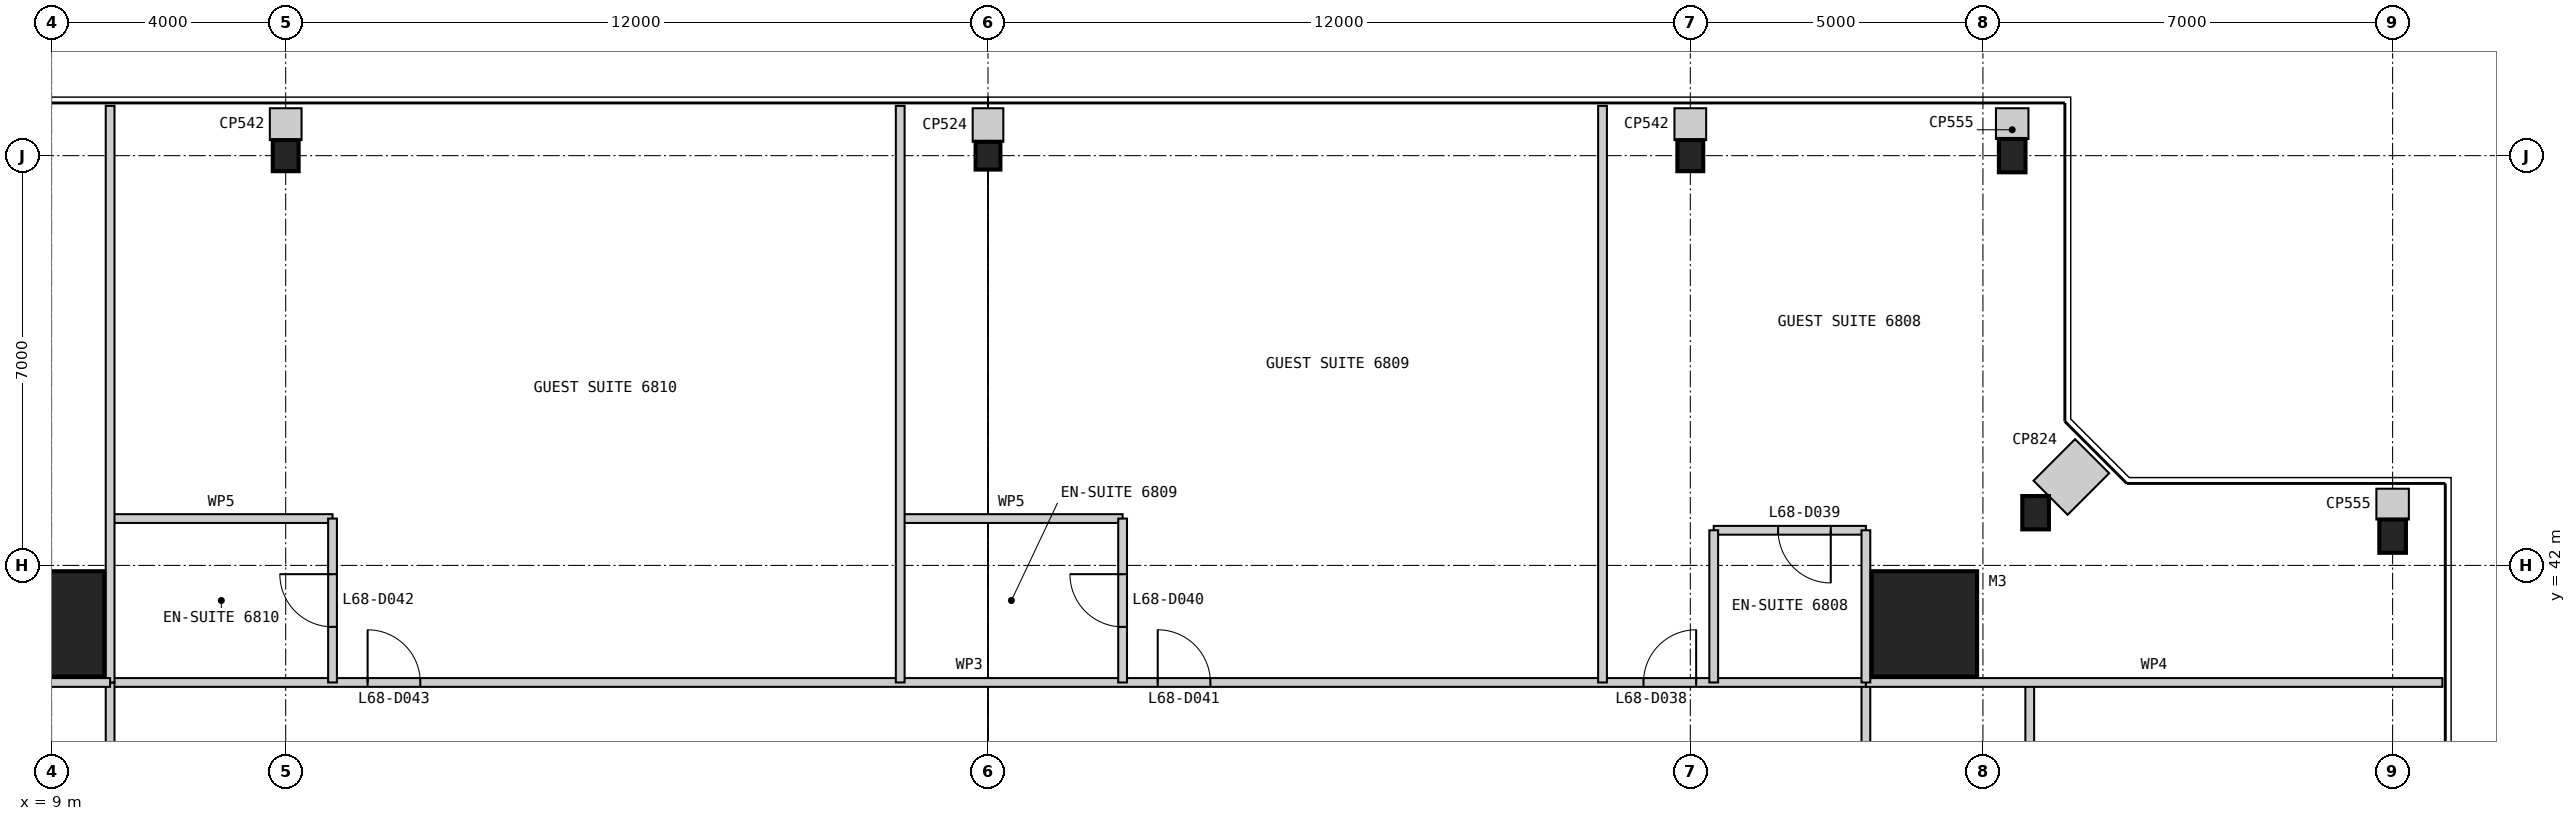
"""IFC4 building model, lengths in metres.
Left out: names, types, materials, properties, quantities, classifications, styles, units other than length and angle.
Written with IfcOpenShell. Run it as: python <this file> out.ifc"""

import sys

from ifc_helpers import new_model, si_unit, direction, frame, frame_2d, origin, origin_2d, place, context, subcontext, project, spatial, rectangle, i_section, extrude, element, fill, save


model = new_model("IFC4")
c1 = context("Model", 3, precision=1e-05, world=origin(), true_north=direction((0.0, 1.0)))
c2 = subcontext(c1, "Body", "Model", "MODEL_VIEW")
j1 = project(units=[si_unit("LENGTHUNIT", "METRE"), si_unit("PLANEANGLEUNIT", "RADIAN")], contexts=[c1])
p1 = place(None, origin())
s1 = spatial("IfcSite", under=j1, at=p1, CompositionType="ELEMENT")
p2 = place(p1, origin())
s2 = spatial("IfcBuilding", under=s1, at=p2, CompositionType="ELEMENT")
p3 = place(p2, frame((0.0, 0.0, 283.2)))
s3 = spatial("IfcBuildingStorey", under=s2, at=p3, CompositionType="ELEMENT", Elevation=283.2)
for number, where, z_axis, x_axis in (
    (1, (41.0, 41.0, 0.0), (0.0, 0.0, 1.0), (1.0, 0.0, 0.0)),
    (2, (9.0, 41.0, 0.0), (0.0, 0.0, 1.0), (1.0, 0.0, 0.0)),
):
    element("IfcColumn", number, at=place(p3, frame(where, z_axis=z_axis, x_axis=x_axis)), inside=s3, PredefinedType="COLUMN", context=c2, shape_type="SweptSolid", body=[
        extrude(rectangle(XDim=1.8, YDim=1.8, at=origin_2d()), origin(), (0.0, 0.0, 1.0), 3.4),
    ])
for number, where, z_axis, x_axis in (
    (3, (49.0, 42.5, 0.0), (0.0, 0.0, 1.0), (1.0, 0.0, 0.0)),
    (4, (42.9, 42.9, 0.0), (0.0, 0.0, 1.0), (1.0, 0.0, 0.0)),
    (5, (42.5, 49.0, 0.0), (0.0, 0.0, 1.0), (1.0, 0.0, 0.0)),
):
    element("IfcColumn", number, at=place(p3, frame(where, z_axis=z_axis, x_axis=x_axis)), inside=s3, PredefinedType="COLUMN", context=c2, shape_type="SweptSolid", body=[
        extrude(i_section(OverallWidth=0.455, OverallDepth=0.569, WebThickness=0.078, FlangeThickness=0.125, at=origin_2d()), origin(), (0.0, 0.0, 1.0), 3.4),
    ])
p4 = place(p3, frame((37.0, 49.0, 0.0), z_axis=(0.0, 0.0, 1.0), x_axis=(1.0, 0.0, 0.0)))
e6 = element("IfcColumn", 6, at=p4, inside=s3, PredefinedType="COLUMN", context=c2, shape_type="SweptSolid", body=[
    extrude(i_section(OverallWidth=0.442, OverallDepth=0.531, WebThickness=0.066, FlangeThickness=0.106, at=origin_2d()), origin(), (0.0, 0.0, 1.0), 3.4),
])
p5 = place(p3, frame((25.0, 49.0, 0.0), z_axis=(0.0, 0.0, 1.0), x_axis=(1.0, 0.0, 0.0)))
e7 = element("IfcColumn", 7, at=p5, inside=s3, PredefinedType="COLUMN", context=c2, shape_type="SweptSolid", body=[
    extrude(i_section(OverallWidth=0.424, OverallDepth=0.475, WebThickness=0.048, FlangeThickness=0.077, at=origin_2d()), origin(), (0.0, 0.0, 1.0), 3.4),
])
p6 = place(p3, frame((13.0, 49.0, 0.0), z_axis=(0.0, 0.0, 1.0), x_axis=(1.0, 0.0, 0.0)))
e8 = element("IfcColumn", 8, at=p6, inside=s3, PredefinedType="COLUMN", context=c2, shape_type="SweptSolid", body=[
    extrude(i_section(OverallWidth=0.442, OverallDepth=0.531, WebThickness=0.066, FlangeThickness=0.106, at=origin_2d()), origin(), (0.0, 0.0, 1.0), 3.4),
])
p7 = place(p3, frame((40.0, 10.0, 0.0), z_axis=(0.0, 0.0, 1.0), x_axis=(0.0, 1.0, 0.0)))
e9 = element("IfcWall", 9, at=p7, inside=s3, PredefinedType="PARTITIONING", context=c2, shape_type="SweptSolid", body=[
    extrude(rectangle(XDim=30.0, YDim=0.15, at=frame_2d((15.0, 0.0))), origin(), (0.0, 0.0, 1.0), 2.638),
])
p8 = place(p7, frame((2.9, 0.0, 0.0)))
e10 = element("IfcOpeningElement", 10, at=p8, cuts=e9, PredefinedType="OPENING", context=c2, shape_type="SweptSolid", body=[
    extrude(rectangle(XDim=0.9, YDim=2.1, at=frame_2d((0.45, 1.05))), frame((0.0, 0.085, 0.0), z_axis=(0.0, -1.0, 0.0), x_axis=(1.0, 0.0, 0.0)), (0.0, 0.0, 1.0), 0.17),
])
p9 = place(p7, frame((11.2, 0.0, 0.0)))
e11 = element("IfcOpeningElement", 11, at=p9, cuts=e9, PredefinedType="OPENING", context=c2, shape_type="SweptSolid", body=[
    extrude(rectangle(XDim=0.9, YDim=2.1, at=frame_2d((0.45, 1.05))), frame((0.0, 0.085, 0.0), z_axis=(0.0, -1.0, 0.0), x_axis=(1.0, 0.0, 0.0)), (0.0, 0.0, 1.0), 0.17),
])
p10 = place(p7, frame((24.7, 0.0, 0.0)))
e12 = element("IfcOpeningElement", 12, at=p10, cuts=e9, PredefinedType="OPENING", context=c2, shape_type="SweptSolid", body=[
    extrude(rectangle(XDim=0.9, YDim=2.1, at=frame_2d((0.45, 1.05))), frame((0.0, 0.085, 0.0), z_axis=(0.0, -1.0, 0.0), x_axis=(1.0, 0.0, 0.0)), (0.0, 0.0, 1.0), 0.17),
])
p11 = place(p3, frame((42.8, 36.2, 0.0), z_axis=(0.0, 0.0, 1.0), x_axis=(0.0, 1.0, 0.0)))
e13 = element("IfcWall", 13, at=p11, inside=s3, PredefinedType="PARTITIONING", context=c2, shape_type="SweptSolid", body=[
    extrude(rectangle(XDim=3.8, YDim=0.15, at=frame_2d((1.9, 0.0))), origin(), (0.0, 0.0, 1.0), 3.25),
])
p12 = place(p3, frame((40.0, 40.0, 0.0), z_axis=(0.0, 0.0, 1.0), x_axis=(-1.0, 0.0, 0.0)))
e14 = element("IfcWall", 14, at=p12, inside=s3, PredefinedType="PARTITIONING", context=c2, shape_type="SweptSolid", body=[
    extrude(rectangle(XDim=30.0, YDim=0.15, at=frame_2d((15.0, 0.0))), origin(), (0.0, 0.0, 1.0), 3.25),
])
p13 = place(p12, frame((2.9, 0.0, 0.0)))
e15 = element("IfcOpeningElement", 15, at=p13, cuts=e14, PredefinedType="OPENING", context=c2, shape_type="SweptSolid", body=[
    extrude(rectangle(XDim=0.9, YDim=2.1, at=frame_2d((0.45, 1.05))), frame((0.0, 0.085, 0.0), z_axis=(0.0, -1.0, 0.0), x_axis=(1.0, 0.0, 0.0)), (0.0, 0.0, 1.0), 0.17),
])
p14 = place(p12, frame((11.2, 0.0, 0.0)))
e16 = element("IfcOpeningElement", 16, at=p14, cuts=e14, PredefinedType="OPENING", context=c2, shape_type="SweptSolid", body=[
    extrude(rectangle(XDim=0.9, YDim=2.1, at=frame_2d((0.45, 1.05))), frame((0.0, 0.085, 0.0), z_axis=(0.0, -1.0, 0.0), x_axis=(1.0, 0.0, 0.0)), (0.0, 0.0, 1.0), 0.17),
])
p15 = place(p12, frame((24.7, 0.0, 0.0)))
e17 = element("IfcOpeningElement", 17, at=p15, cuts=e14, PredefinedType="OPENING", context=c2, shape_type="SweptSolid", body=[
    extrude(rectangle(XDim=0.9, YDim=2.1, at=frame_2d((0.45, 1.05))), frame((0.0, 0.085, 0.0), z_axis=(0.0, -1.0, 0.0), x_axis=(1.0, 0.0, 0.0)), (0.0, 0.0, 1.0), 0.17),
])
p16 = place(p3, frame((49.85, 40.0, 0.0), z_axis=(0.0, 0.0, 1.0), x_axis=(-1.0, 0.0, 0.0)))
e18 = element("IfcWall", 18, at=p16, inside=s3, PredefinedType="PARTITIONING", context=c2, shape_type="SweptSolid", body=[
    extrude(rectangle(XDim=9.85, YDim=0.15, at=frame_2d((4.925, 0.0))), origin(), (0.0, 0.0, 1.0), 3.25),
])
p17 = place(p3, frame((40.0, 42.6, 0.0), z_axis=(0.0, 0.0, 1.0), x_axis=(-1.0, 0.0, 0.0)))
e19 = element("IfcWall", 19, at=p17, inside=s3, PredefinedType="PARTITIONING", context=c2, shape_type="SweptSolid", body=[
    extrude(rectangle(XDim=2.6, YDim=0.15, at=frame_2d((1.3, 0.0))), origin(), (0.0, 0.0, 1.0), 3.25),
])
p18 = place(p17, frame((0.6, 0.0, 0.0)))
e20 = element("IfcOpeningElement", 20, at=p18, cuts=e19, PredefinedType="OPENING", context=c2, shape_type="SweptSolid", body=[
    extrude(rectangle(XDim=0.9, YDim=2.1, at=frame_2d((0.45, 1.05))), frame((0.0, 0.085, 0.0), z_axis=(0.0, -1.0, 0.0), x_axis=(1.0, 0.0, 0.0)), (0.0, 0.0, 1.0), 0.17),
])
for number, where, z_axis, x_axis in (
    (21, (40.0, 42.6, 0.0), (0.0, 0.0, 1.0), (0.0, -1.0, 0.0)),
    (22, (37.4, 42.6, 0.0), (0.0, 0.0, 1.0), (0.0, -1.0, 0.0)),
):
    element("IfcWall", number, at=place(p3, frame(where, z_axis=z_axis, x_axis=x_axis)), inside=s3, PredefinedType="PARTITIONING", context=c2, shape_type="SweptSolid", body=[
        extrude(rectangle(XDim=2.6, YDim=0.15, at=frame_2d((1.3, 0.0))), origin(), (0.0, 0.0, 1.0), 3.25),
    ])
p19 = place(p3, frame((35.5, 49.85, 0.0), z_axis=(0.0, 0.0, 1.0), x_axis=(0.0, -1.0, 0.0)))
e23 = element("IfcWall", 23, at=p19, inside=s3, PredefinedType="PARTITIONING", context=c2, shape_type="SweptSolid", body=[
    extrude(rectangle(XDim=9.85, YDim=0.15, at=frame_2d((4.925, 0.0))), origin(), (0.0, 0.0, 1.0), 3.25),
])
p20 = place(p3, frame((27.3, 42.8, 0.0), z_axis=(0.0, 0.0, 1.0), x_axis=(-1.0, 0.0, 0.0)))
e24 = element("IfcWall", 24, at=p20, inside=s3, PredefinedType="PARTITIONING", context=c2, shape_type="SweptSolid", body=[
    extrude(rectangle(XDim=3.8, YDim=0.15, at=frame_2d((1.9, 0.0))), origin(), (0.0, 0.0, 1.0), 3.25),
])
p21 = place(p3, frame((27.3, 42.8, 0.0), z_axis=(0.0, 0.0, 1.0), x_axis=(0.0, -1.0, 0.0)))
e25 = element("IfcWall", 25, at=p21, inside=s3, PredefinedType="PARTITIONING", context=c2, shape_type="SweptSolid", body=[
    extrude(rectangle(XDim=2.8, YDim=0.15, at=frame_2d((1.4, 0.0))), origin(), (0.0, 0.0, 1.0), 3.25),
])
p22 = place(p21, frame((0.95, 0.0, 0.0)))
e26 = element("IfcOpeningElement", 26, at=p22, cuts=e25, PredefinedType="OPENING", context=c2, shape_type="SweptSolid", body=[
    extrude(rectangle(XDim=0.9, YDim=2.1, at=frame_2d((0.45, 1.05))), frame((0.0, 0.085, 0.0), z_axis=(0.0, -1.0, 0.0), x_axis=(1.0, 0.0, 0.0)), (0.0, 0.0, 1.0), 0.17),
])
p23 = place(p3, frame((23.5, 49.85, 0.0), z_axis=(0.0, 0.0, 1.0), x_axis=(0.0, -1.0, 0.0)))
e27 = element("IfcWall", 27, at=p23, inside=s3, PredefinedType="PARTITIONING", context=c2, shape_type="SweptSolid", body=[
    extrude(rectangle(XDim=9.85, YDim=0.15, at=frame_2d((4.925, 0.0))), origin(), (0.0, 0.0, 1.0), 3.25),
])
p24 = place(p3, frame((13.8, 42.8, 0.0), z_axis=(0.0, 0.0, 1.0), x_axis=(-1.0, 0.0, 0.0)))
e28 = element("IfcWall", 28, at=p24, inside=s3, PredefinedType="PARTITIONING", context=c2, shape_type="SweptSolid", body=[
    extrude(rectangle(XDim=3.8, YDim=0.15, at=frame_2d((1.9, 0.0))), origin(), (0.0, 0.0, 1.0), 3.25),
])
p25 = place(p3, frame((13.8, 42.8, 0.0), z_axis=(0.0, 0.0, 1.0), x_axis=(0.0, -1.0, 0.0)))
e29 = element("IfcWall", 29, at=p25, inside=s3, PredefinedType="PARTITIONING", context=c2, shape_type="SweptSolid", body=[
    extrude(rectangle(XDim=2.8, YDim=0.15, at=frame_2d((1.4, 0.0))), origin(), (0.0, 0.0, 1.0), 3.25),
])
p26 = place(p25, frame((0.95, 0.0, 0.0)))
e30 = element("IfcOpeningElement", 30, at=p26, cuts=e29, PredefinedType="OPENING", context=c2, shape_type="SweptSolid", body=[
    extrude(rectangle(XDim=0.9, YDim=2.1, at=frame_2d((0.45, 1.05))), frame((0.0, 0.085, 0.0), z_axis=(0.0, -1.0, 0.0), x_axis=(1.0, 0.0, 0.0)), (0.0, 0.0, 1.0), 0.17),
])
p27 = place(p3, frame((10.0, 40.0, 0.0), z_axis=(0.0, 0.0, 1.0), x_axis=(0.0, -1.0, 0.0)))
e31 = element("IfcWall", 31, at=p27, inside=s3, PredefinedType="PARTITIONING", context=c2, shape_type="SweptSolid", body=[
    extrude(rectangle(XDim=30.0, YDim=0.15, at=frame_2d((15.0, 0.0))), origin(), (0.0, 0.0, 1.0), 2.638),
])
p28 = place(p27, frame((2.9, 0.0, 0.0)))
e32 = element("IfcOpeningElement", 32, at=p28, cuts=e31, PredefinedType="OPENING", context=c2, shape_type="SweptSolid", body=[
    extrude(rectangle(XDim=0.9, YDim=2.1, at=frame_2d((0.45, 1.05))), frame((0.0, 0.085, 0.0), z_axis=(0.0, -1.0, 0.0), x_axis=(1.0, 0.0, 0.0)), (0.0, 0.0, 1.0), 0.17),
])
p29 = place(p27, frame((11.2, 0.0, 0.0)))
e33 = element("IfcOpeningElement", 33, at=p29, cuts=e31, PredefinedType="OPENING", context=c2, shape_type="SweptSolid", body=[
    extrude(rectangle(XDim=0.9, YDim=2.1, at=frame_2d((0.45, 1.05))), frame((0.0, 0.085, 0.0), z_axis=(0.0, -1.0, 0.0), x_axis=(1.0, 0.0, 0.0)), (0.0, 0.0, 1.0), 0.17),
])
p30 = place(p27, frame((24.7, 0.0, 0.0)))
e34 = element("IfcOpeningElement", 34, at=p30, cuts=e31, PredefinedType="OPENING", context=c2, shape_type="SweptSolid", body=[
    extrude(rectangle(XDim=0.9, YDim=2.1, at=frame_2d((0.45, 1.05))), frame((0.0, 0.085, 0.0), z_axis=(0.0, -1.0, 0.0), x_axis=(1.0, 0.0, 0.0)), (0.0, 0.0, 1.0), 0.17),
])
p31 = place(p3, frame((10.0, 49.85, 0.0), z_axis=(0.0, 0.0, 1.0), x_axis=(0.0, -1.0, 0.0)))
e35 = element("IfcWall", 35, at=p31, inside=s3, PredefinedType="PARTITIONING", context=c2, shape_type="SweptSolid", body=[
    extrude(rectangle(XDim=9.85, YDim=0.15, at=frame_2d((4.925, 0.0))), origin(), (0.0, 0.0, 1.0), 3.25),
])
p32 = place(p3, frame((7.4, 40.0, 0.0), z_axis=(0.0, 0.0, 1.0), x_axis=(1.0, 0.0, 0.0)))
e36 = element("IfcWall", 36, at=p32, inside=s3, PredefinedType="PARTITIONING", context=c2, shape_type="SweptSolid", body=[
    extrude(rectangle(XDim=2.6, YDim=0.15, at=frame_2d((1.3, 0.0))), origin(), (0.0, 0.0, 1.0), 3.25),
])
p33 = place(p3, frame((49.0, 43.31, 0.0), z_axis=(0.0, 0.0, 1.0), x_axis=(0.0, -1.0, 0.0)))
e37 = element("IfcWall", 37, at=p33, inside=s3, PredefinedType="PARTITIONING", context=c2, shape_type="SweptSolid", body=[
    extrude(rectangle(XDim=0.526, YDim=0.555, at=frame_2d((0.263, 0.0))), origin(), (0.0, 0.0, 1.0), 3.25),
])
p34 = place(p3, frame((43.866, 43.866, 0.0), z_axis=(0.0, 0.0, 1.0), x_axis=(-0.707106781187, -0.707106781187, 0.0)))
e38 = element("IfcWall", 38, at=p34, inside=s3, PredefinedType="PARTITIONING", context=c2, shape_type="SweptSolid", body=[
    extrude(rectangle(XDim=1.004, YDim=0.824, at=frame_2d((0.502, 0.0))), origin(), (0.0, 0.0, 1.0), 3.25),
])
p35 = place(p3, frame((42.5, 49.81, 0.0), z_axis=(0.0, 0.0, 1.0), x_axis=(0.0, -1.0, 0.0)))
e39 = element("IfcWall", 39, at=p35, inside=s3, PredefinedType="PARTITIONING", context=c2, shape_type="SweptSolid", body=[
    extrude(rectangle(XDim=0.526, YDim=0.555, at=frame_2d((0.263, 0.0))), origin(), (0.0, 0.0, 1.0), 3.25),
])
p36 = place(p3, frame((37.0, 49.81, 0.0), z_axis=(0.0, 0.0, 1.0), x_axis=(0.0, -1.0, 0.0)))
e40 = element("IfcWall", 40, at=p36, inside=s3, PredefinedType="PARTITIONING", context=c2, shape_type="SweptSolid", body=[
    extrude(rectangle(XDim=0.545, YDim=0.542, at=frame_2d((0.272, 0.0))), origin(), (0.0, 0.0, 1.0), 3.25),
])
p37 = place(p3, frame((25.0, 49.81, 0.0), z_axis=(0.0, 0.0, 1.0), x_axis=(0.0, -1.0, 0.0)))
e41 = element("IfcWall", 41, at=p37, inside=s3, PredefinedType="PARTITIONING", context=c2, shape_type="SweptSolid", body=[
    extrude(rectangle(XDim=0.573, YDim=0.524, at=frame_2d((0.286, 0.0))), origin(), (0.0, 0.0, 1.0), 3.25),
])
p38 = place(p3, frame((13.0, 49.81, 0.0), z_axis=(0.0, 0.0, 1.0), x_axis=(0.0, -1.0, 0.0)))
e42 = element("IfcWall", 42, at=p38, inside=s3, PredefinedType="PARTITIONING", context=c2, shape_type="SweptSolid", body=[
    extrude(rectangle(XDim=0.545, YDim=0.542, at=frame_2d((0.272, 0.0))), origin(), (0.0, 0.0, 1.0), 3.25),
])
p39 = place(p13, frame((0.9, 0.0, 0.0), z_axis=(0.0, 0.0, 1.0), x_axis=(-1.0, 0.0, 0.0)))
e43 = element("IfcDoor", 43, at=p39, inside=s3, OperationType="SINGLE_SWING_RIGHT", PredefinedType="DOOR", context=c2, shape_type="SweptSolid", body=[
    extrude(rectangle(XDim=0.9, YDim=2.1, at=frame_2d((0.45, 1.05))), frame((0.0, 0.025, 0.0), z_axis=(0.0, -1.0, 0.0), x_axis=(1.0, 0.0, 0.0)), (0.0, 0.0, 1.0), 0.05),
])
fill(e15, e43)
p40 = place(p18, origin())
e44 = element("IfcDoor", 44, at=p40, inside=s3, OperationType="SINGLE_SWING_LEFT", PredefinedType="DOOR", context=c2, shape_type="SweptSolid", body=[
    extrude(rectangle(XDim=0.9, YDim=2.1, at=frame_2d((0.45, 1.05))), frame((0.0, 0.025, 0.0), z_axis=(0.0, -1.0, 0.0), x_axis=(1.0, 0.0, 0.0)), (0.0, 0.0, 1.0), 0.05),
])
fill(e20, e44)
p41 = place(p22, frame((0.9, 0.0, 0.0), z_axis=(0.0, 0.0, 1.0), x_axis=(-1.0, 0.0, 0.0)))
e45 = element("IfcDoor", 45, at=p41, inside=s3, OperationType="SINGLE_SWING_RIGHT", PredefinedType="DOOR", context=c2, shape_type="SweptSolid", body=[
    extrude(rectangle(XDim=0.9, YDim=2.1, at=frame_2d((0.45, 1.05))), frame((0.0, 0.025, 0.0), z_axis=(0.0, -1.0, 0.0), x_axis=(1.0, 0.0, 0.0)), (0.0, 0.0, 1.0), 0.05),
])
fill(e26, e45)
p42 = place(p14, frame((0.9, 0.0, 0.0), z_axis=(0.0, 0.0, 1.0), x_axis=(-1.0, 0.0, 0.0)))
e46 = element("IfcDoor", 46, at=p42, inside=s3, OperationType="SINGLE_SWING_LEFT", PredefinedType="DOOR", context=c2, shape_type="SweptSolid", body=[
    extrude(rectangle(XDim=0.9, YDim=2.1, at=frame_2d((0.45, 1.05))), frame((0.0, 0.025, 0.0), z_axis=(0.0, -1.0, 0.0), x_axis=(1.0, 0.0, 0.0)), (0.0, 0.0, 1.0), 0.05),
])
fill(e16, e46)
p43 = place(p26, frame((0.9, 0.0, 0.0), z_axis=(0.0, 0.0, 1.0), x_axis=(-1.0, 0.0, 0.0)))
e47 = element("IfcDoor", 47, at=p43, inside=s3, OperationType="SINGLE_SWING_RIGHT", PredefinedType="DOOR", context=c2, shape_type="SweptSolid", body=[
    extrude(rectangle(XDim=0.9, YDim=2.1, at=frame_2d((0.45, 1.05))), frame((0.0, 0.025, 0.0), z_axis=(0.0, -1.0, 0.0), x_axis=(1.0, 0.0, 0.0)), (0.0, 0.0, 1.0), 0.05),
])
fill(e30, e47)
p44 = place(p15, frame((0.9, 0.0, 0.0), z_axis=(0.0, 0.0, 1.0), x_axis=(-1.0, 0.0, 0.0)))
e48 = element("IfcDoor", 48, at=p44, inside=s3, OperationType="SINGLE_SWING_LEFT", PredefinedType="DOOR", context=c2, shape_type="SweptSolid", body=[
    extrude(rectangle(XDim=0.9, YDim=2.1, at=frame_2d((0.45, 1.05))), frame((0.0, 0.025, 0.0), z_axis=(0.0, -1.0, 0.0), x_axis=(1.0, 0.0, 0.0)), (0.0, 0.0, 1.0), 0.05),
])
fill(e17, e48)
save(model, sys.argv[1])
